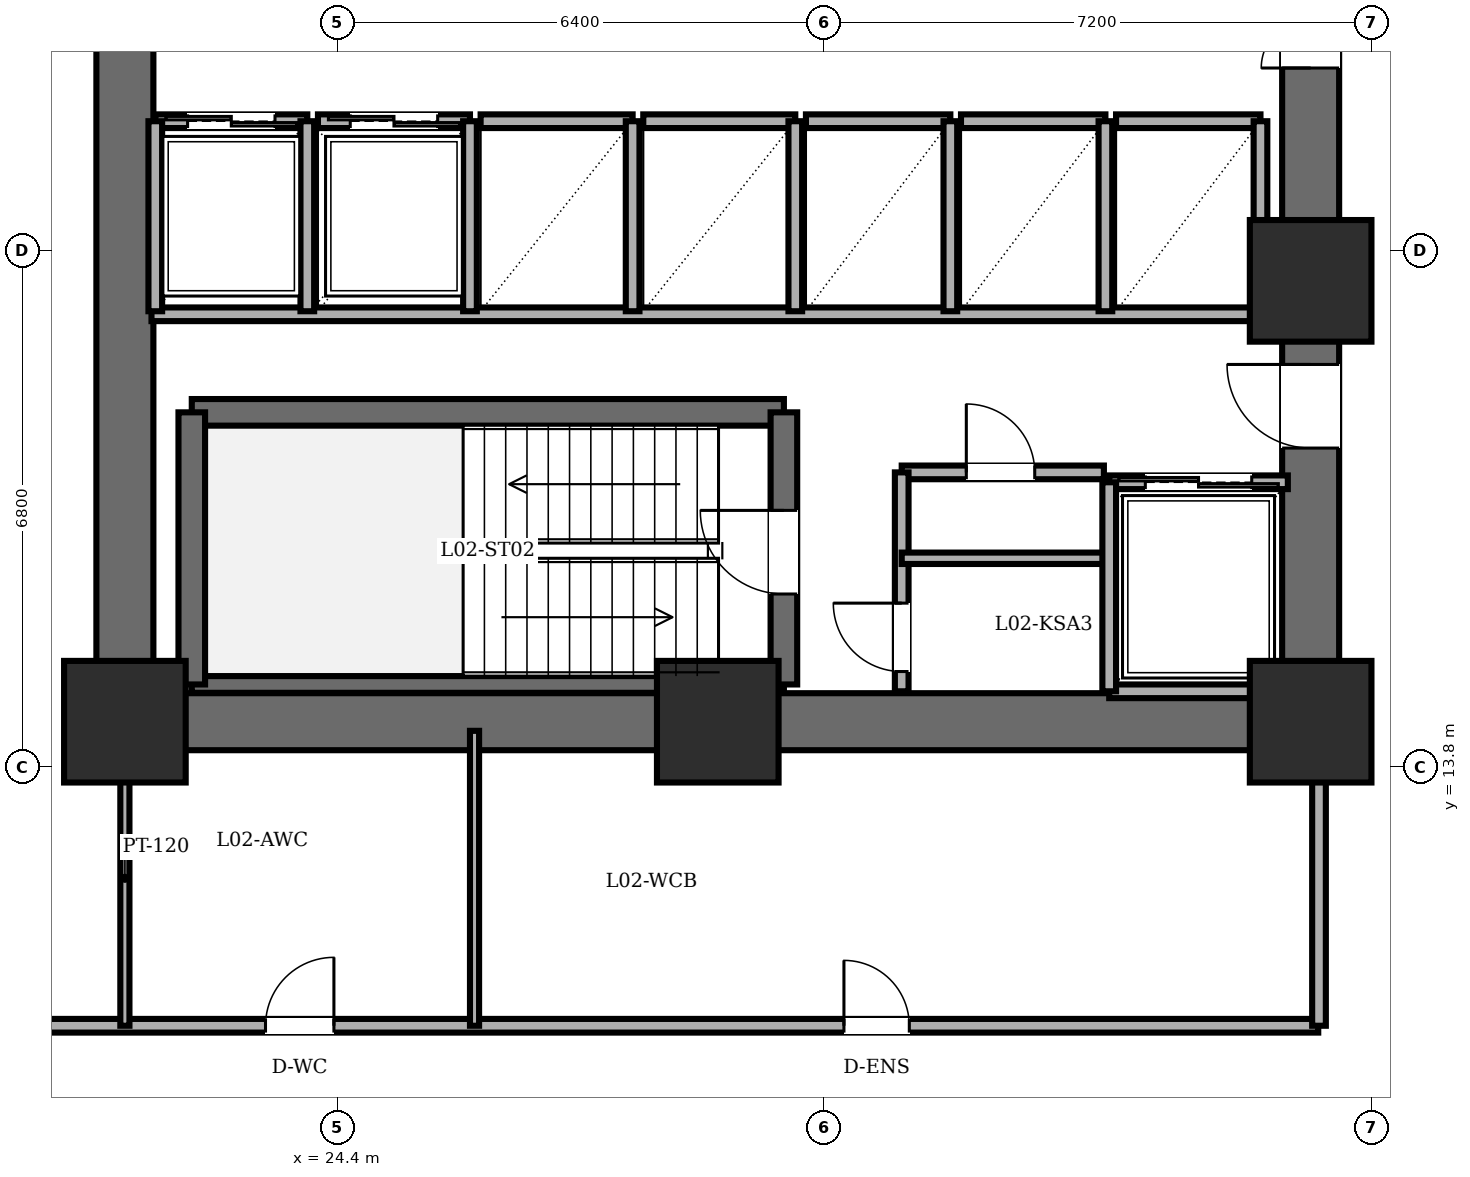
"""IFC4 building model, lengths in metres.
Left out: names, types, materials, properties, quantities, classifications, styles, units other than length and angle.
Written with IfcOpenShell. Run it as: python <this file> out.ifc"""

import sys

from ifc_helpers import new_model, si_unit, direction, frame, frame_2d, origin, origin_2d, place, context, subcontext, project, spatial, rectangle, extrude, element, fill, save


model = new_model("IFC4")
c1 = context("Model", 3, precision=1e-05, world=origin(), true_north=direction((0.0, 1.0)))
c2 = subcontext(c1, "Body", "Model", "MODEL_VIEW")
j1 = project(units=[si_unit("LENGTHUNIT", "METRE"), si_unit("PLANEANGLEUNIT", "RADIAN")], contexts=[c1])
p1 = place(None, origin())
s1 = spatial("IfcSite", under=j1, at=p1, CompositionType="ELEMENT")
p2 = place(p1, origin())
s2 = spatial("IfcBuilding", under=s1, at=p2, CompositionType="ELEMENT")
p3 = place(p2, frame((0.0, 0.0, 5.4)))
s3 = spatial("IfcBuildingStorey", under=s2, at=p3, CompositionType="ELEMENT", Elevation=5.4)
for number, where, z_axis, x_axis in (
    (1, (21.6, 14.4, 0.0), (0.0, 0.0, 1.0), (1.0, 0.0, 0.0)),
    (2, (29.4, 14.4, 0.0), (0.0, 0.0, 1.0), (1.0, 0.0, 0.0)),
    (3, (37.2, 14.4, 0.0), (0.0, 0.0, 1.0), (1.0, 0.0, 0.0)),
    (4, (37.2, 20.2, 0.0), (0.0, 0.0, 1.0), (1.0, 0.0, 0.0)),
):
    element("IfcColumn", number, at=place(p3, frame(where, z_axis=z_axis, x_axis=x_axis)), inside=s3, PredefinedType="COLUMN", context=c2, shape_type="SweptSolid", body=[
        extrude(rectangle(XDim=1.6, YDim=1.6, at=origin_2d()), origin(), (0.0, 0.0, 1.0), 4.65),
    ])
p4 = place(p3, frame((21.6, 14.4, 0.0), z_axis=(0.0, 0.0, 1.0), x_axis=(0.0, 1.0, 0.0)))
e5 = element("IfcWall", 5, at=p4, inside=s3, PredefinedType="SHEAR", context=c2, shape_type="SweptSolid", body=[
    extrude(rectangle(XDim=19.2, YDim=0.75, at=frame_2d((9.6, 0.0))), origin(), (0.0, 0.0, 1.0), 4.43),
])
p5 = place(p3, frame((37.2, 14.4, 0.0), z_axis=(0.0, 0.0, 1.0), x_axis=(-1.0, 0.0, 0.0)))
e6 = element("IfcWall", 6, at=p5, inside=s3, PredefinedType="SHEAR", context=c2, shape_type="SweptSolid", body=[
    extrude(rectangle(XDim=15.6, YDim=0.75, at=frame_2d((7.8, 0.0))), origin(), (0.0, 0.0, 1.0), 4.43),
])
p6 = place(p3, frame((37.2, 14.4, 0.0), z_axis=(0.0, 0.0, 1.0), x_axis=(0.0, 1.0, 0.0)))
e7 = element("IfcWall", 7, at=p6, inside=s3, PredefinedType="SHEAR", context=c2, shape_type="SweptSolid", body=[
    extrude(rectangle(XDim=19.2, YDim=0.75, at=frame_2d((9.6, 0.0))), origin(), (0.0, 0.0, 1.0), 4.43),
])
p7 = place(p6, frame((15.8, 0.0, 0.0)))
e8 = element("IfcOpeningElement", 8, at=p7, cuts=e7, PredefinedType="OPENING", context=c2, shape_type="SweptSolid", body=[
    extrude(rectangle(XDim=1.15, YDim=2.15, at=frame_2d((0.575, 1.075))), frame((0.0, 0.385, 0.0), z_axis=(0.0, -1.0, 0.0), x_axis=(1.0, 0.0, 0.0)), (0.0, 0.0, 1.0), 0.77),
])
p8 = place(p6, frame((3.6, 0.0, 0.0)))
e9 = element("IfcOpeningElement", 9, at=p8, cuts=e7, PredefinedType="OPENING", context=c2, shape_type="SweptSolid", body=[
    extrude(rectangle(XDim=1.1, YDim=2.15, at=frame_2d((0.55, 1.075))), frame((0.0, 0.385, 0.0), z_axis=(0.0, -1.0, 0.0), x_axis=(1.0, 0.0, 0.0)), (0.0, 0.0, 1.0), 0.77),
])
p9 = place(p6, frame((8.6, 0.0, 0.0)))
e10 = element("IfcOpeningElement", 10, at=p9, cuts=e7, PredefinedType="OPENING", context=c2, shape_type="SweptSolid", body=[
    extrude(rectangle(XDim=1.3, YDim=2.2, at=frame_2d((0.65, 1.1))), frame((0.0, 0.385, 0.0), z_axis=(0.0, -1.0, 0.0), x_axis=(1.0, 0.0, 0.0)), (0.0, 0.0, 1.0), 0.77),
])
p10 = place(p3, frame((22.48, 18.47, 0.0), z_axis=(0.0, 0.0, 1.0), x_axis=(1.0, 0.0, 0.0)))
e11 = element("IfcWall", 11, at=p10, inside=s3, PredefinedType="SOLIDWALL", context=c2, shape_type="SweptSolid", body=[
    extrude(rectangle(XDim=7.79, YDim=0.35, at=frame_2d((3.895, 0.0))), origin(), (0.0, 0.0, 1.0), 4.43),
])
p11 = place(p3, frame((22.48, 14.89, 0.0), z_axis=(0.0, 0.0, 1.0), x_axis=(1.0, 0.0, 0.0)))
e12 = element("IfcWall", 12, at=p11, inside=s3, PredefinedType="PARTITIONING", context=c2, shape_type="SweptSolid", body=[
    extrude(rectangle(XDim=7.79, YDim=0.22, at=frame_2d((3.895, 0.0))), origin(), (0.0, 0.0, 1.0), 4.43),
])
p12 = place(p3, frame((22.48, 14.89, 0.0), z_axis=(0.0, 0.0, 1.0), x_axis=(0.0, 1.0, 0.0)))
e13 = element("IfcWall", 13, at=p12, inside=s3, PredefinedType="SOLIDWALL", context=c2, shape_type="SweptSolid", body=[
    extrude(rectangle(XDim=3.58, YDim=0.35, at=frame_2d((1.79, 0.0))), origin(), (0.0, 0.0, 1.0), 4.43),
])
p13 = place(p3, frame((30.27, 14.89, 0.0), z_axis=(0.0, 0.0, 1.0), x_axis=(0.0, 1.0, 0.0)))
e14 = element("IfcWall", 14, at=p13, inside=s3, PredefinedType="SOLIDWALL", context=c2, shape_type="SweptSolid", body=[
    extrude(rectangle(XDim=3.58, YDim=0.35, at=frame_2d((1.79, 0.0))), origin(), (0.0, 0.0, 1.0), 4.43),
])
p14 = place(p13, frame((1.19, 0.0, 0.0)))
e15 = element("IfcOpeningElement", 15, at=p14, cuts=e14, PredefinedType="OPENING", context=c2, shape_type="SweptSolid", body=[
    extrude(rectangle(XDim=1.1, YDim=2.15, at=frame_2d((0.55, 1.075))), frame((0.0, 0.185, 0.0), z_axis=(0.0, -1.0, 0.0), x_axis=(1.0, 0.0, 0.0)), (0.0, 0.0, 1.0), 0.37),
])
p15 = place(p3, frame((21.95, 19.76, 0.0), z_axis=(0.0, 0.0, 1.0), x_axis=(1.0, 0.0, 0.0)))
e16 = element("IfcWall", 16, at=p15, inside=s3, PredefinedType="PARTITIONING", context=c2, shape_type="SweptSolid", body=[
    extrude(rectangle(XDim=14.87, YDim=0.18, at=frame_2d((7.435, 0.0))), origin(), (0.0, 0.0, 1.0), 4.43),
])
p16 = place(p3, frame((31.82, 17.68, 0.0), z_axis=(0.0, 0.0, 1.0), x_axis=(1.0, 0.0, 0.0)))
e17 = element("IfcWall", 17, at=p16, inside=s3, PredefinedType="PARTITIONING", context=c2, shape_type="SweptSolid", body=[
    extrude(rectangle(XDim=2.66, YDim=0.18, at=frame_2d((1.33, 0.0))), origin(), (0.0, 0.0, 1.0), 4.43),
])
p17 = place(p16, frame((0.85, 0.0, 0.0)))
e18 = element("IfcOpeningElement", 18, at=p17, cuts=e17, PredefinedType="OPENING", context=c2, shape_type="SweptSolid", body=[
    extrude(rectangle(XDim=0.9, YDim=2.05, at=frame_2d((0.45, 1.025))), frame((0.0, 0.1, 0.0), z_axis=(0.0, -1.0, 0.0), x_axis=(1.0, 0.0, 0.0)), (0.0, 0.0, 1.0), 0.2),
])
p18 = place(p3, frame((31.82, 14.8, 0.0), z_axis=(0.0, 0.0, 1.0), x_axis=(0.0, 1.0, 0.0)))
e19 = element("IfcWall", 19, at=p18, inside=s3, PredefinedType="PARTITIONING", context=c2, shape_type="SweptSolid", body=[
    extrude(rectangle(XDim=2.88, YDim=0.18, at=frame_2d((1.44, 0.0))), origin(), (0.0, 0.0, 1.0), 4.43),
])
p19 = place(p18, frame((0.26, 0.0, 0.0)))
e20 = element("IfcOpeningElement", 20, at=p19, cuts=e19, PredefinedType="OPENING", context=c2, shape_type="SweptSolid", body=[
    extrude(rectangle(XDim=0.9, YDim=2.05, at=frame_2d((0.45, 1.025))), frame((0.0, 0.1, 0.0), z_axis=(0.0, -1.0, 0.0), x_axis=(1.0, 0.0, 0.0)), (0.0, 0.0, 1.0), 0.2),
])
p20 = place(p3, frame((31.82, 16.55, 0.0), z_axis=(0.0, 0.0, 1.0), x_axis=(1.0, 0.0, 0.0)))
e21 = element("IfcWall", 21, at=p20, inside=s3, PredefinedType="PARTITIONING", context=c2, shape_type="SweptSolid", body=[
    extrude(rectangle(XDim=2.66, YDim=0.15, at=frame_2d((1.33, 0.0))), origin(), (0.0, 0.0, 1.0), 4.43),
])
p21 = place(p3, frame((34.55, 17.55, 0.0), z_axis=(0.0, 0.0, 1.0), x_axis=(1.0, 0.0, 0.0)))
e22 = element("IfcWall", 22, at=p21, inside=s3, PredefinedType="PARTITIONING", context=c2, shape_type="SweptSolid", body=[
    extrude(rectangle(XDim=2.35, YDim=0.18, at=frame_2d((1.175, 0.0))), origin(), (0.0, 0.0, 1.0), 4.43),
])
p22 = place(p21, frame((0.475, 0.0, 0.0)))
e23 = element("IfcOpeningElement", 23, at=p22, cuts=e22, PredefinedType="OPENING", context=c2, shape_type="SweptSolid", body=[
    extrude(rectangle(XDim=1.4, YDim=2.3, at=frame_2d((0.7, 1.15))), frame((0.0, 0.1, 0.0), z_axis=(0.0, -1.0, 0.0), x_axis=(1.0, 0.0, 0.0)), (0.0, 0.0, 1.0), 0.2),
])
p23 = place(p3, frame((36.9, 14.8, 0.0), z_axis=(0.0, 0.0, 1.0), x_axis=(-1.0, 0.0, 0.0)))
e24 = element("IfcWall", 24, at=p23, inside=s3, PredefinedType="PARTITIONING", context=c2, shape_type="SweptSolid", body=[
    extrude(rectangle(XDim=2.35, YDim=0.18, at=frame_2d((1.175, 0.0))), origin(), (0.0, 0.0, 1.0), 4.43),
])
p24 = place(p3, frame((34.55, 17.55, 0.0), z_axis=(0.0, 0.0, 1.0), x_axis=(0.0, -1.0, 0.0)))
e25 = element("IfcWall", 25, at=p24, inside=s3, PredefinedType="PARTITIONING", context=c2, shape_type="SweptSolid", body=[
    extrude(rectangle(XDim=2.75, YDim=0.18, at=frame_2d((1.375, 0.0))), origin(), (0.0, 0.0, 1.0), 4.43),
])
p25 = place(p3, frame((22.0, 22.3, 0.0), z_axis=(0.0, 0.0, 1.0), x_axis=(1.0, 0.0, 0.0)))
e26 = element("IfcWall", 26, at=p25, inside=s3, PredefinedType="PARTITIONING", context=c2, shape_type="SweptSolid", body=[
    extrude(rectangle(XDim=2.0, YDim=0.18, at=frame_2d((1.0, 0.0))), origin(), (0.0, 0.0, 1.0), 4.43),
])
p26 = place(p25, frame((0.425, 0.0, 0.0)))
e27 = element("IfcOpeningElement", 27, at=p26, cuts=e26, PredefinedType="OPENING", context=c2, shape_type="SweptSolid", body=[
    extrude(rectangle(XDim=1.15, YDim=2.2, at=frame_2d((0.575, 1.1))), frame((0.0, 0.1, 0.0), z_axis=(0.0, -1.0, 0.0), x_axis=(1.0, 0.0, 0.0)), (0.0, 0.0, 1.0), 0.2),
])
for number, where, z_axis, x_axis in (
    (28, (24.0, 19.8, 0.0), (0.0, 0.0, 1.0), (0.0, 1.0, 0.0)),
    (29, (22.0, 22.3, 0.0), (0.0, 0.0, 1.0), (0.0, -1.0, 0.0)),
):
    element("IfcWall", number, at=place(p3, frame(where, z_axis=z_axis, x_axis=x_axis)), inside=s3, PredefinedType="PARTITIONING", context=c2, shape_type="SweptSolid", body=[
        extrude(rectangle(XDim=2.5, YDim=0.18, at=frame_2d((1.25, 0.0))), origin(), (0.0, 0.0, 1.0), 4.43),
    ])
p27 = place(p3, frame((24.14, 22.3, 0.0), z_axis=(0.0, 0.0, 1.0), x_axis=(1.0, 0.0, 0.0)))
e30 = element("IfcWall", 30, at=p27, inside=s3, PredefinedType="PARTITIONING", context=c2, shape_type="SweptSolid", body=[
    extrude(rectangle(XDim=2.0, YDim=0.18, at=frame_2d((1.0, 0.0))), origin(), (0.0, 0.0, 1.0), 4.43),
])
p28 = place(p27, frame((0.425, 0.0, 0.0)))
e31 = element("IfcOpeningElement", 31, at=p28, cuts=e30, PredefinedType="OPENING", context=c2, shape_type="SweptSolid", body=[
    extrude(rectangle(XDim=1.15, YDim=2.2, at=frame_2d((0.575, 1.1))), frame((0.0, 0.1, 0.0), z_axis=(0.0, -1.0, 0.0), x_axis=(1.0, 0.0, 0.0)), (0.0, 0.0, 1.0), 0.2),
])
p29 = place(p3, frame((26.14, 19.8, 0.0), z_axis=(0.0, 0.0, 1.0), x_axis=(0.0, 1.0, 0.0)))
e32 = element("IfcWall", 32, at=p29, inside=s3, PredefinedType="PARTITIONING", context=c2, shape_type="SweptSolid", body=[
    extrude(rectangle(XDim=2.5, YDim=0.18, at=frame_2d((1.25, 0.0))), origin(), (0.0, 0.0, 1.0), 4.43),
])
p30 = place(p3, frame((26.28, 22.3, 0.0), z_axis=(0.0, 0.0, 1.0), x_axis=(1.0, 0.0, 0.0)))
e33 = element("IfcWall", 33, at=p30, inside=s3, PredefinedType="PARTITIONING", context=c2, shape_type="SweptSolid", body=[
    extrude(rectangle(XDim=2.0, YDim=0.18, at=frame_2d((1.0, 0.0))), origin(), (0.0, 0.0, 1.0), 4.43),
])
p31 = place(p3, frame((28.28, 19.8, 0.0), z_axis=(0.0, 0.0, 1.0), x_axis=(0.0, 1.0, 0.0)))
e34 = element("IfcWall", 34, at=p31, inside=s3, PredefinedType="PARTITIONING", context=c2, shape_type="SweptSolid", body=[
    extrude(rectangle(XDim=2.5, YDim=0.18, at=frame_2d((1.25, 0.0))), origin(), (0.0, 0.0, 1.0), 4.43),
])
p32 = place(p3, frame((28.42, 22.3, 0.0), z_axis=(0.0, 0.0, 1.0), x_axis=(1.0, 0.0, 0.0)))
e35 = element("IfcWall", 35, at=p32, inside=s3, PredefinedType="PARTITIONING", context=c2, shape_type="SweptSolid", body=[
    extrude(rectangle(XDim=2.0, YDim=0.18, at=frame_2d((1.0, 0.0))), origin(), (0.0, 0.0, 1.0), 4.43),
])
p33 = place(p3, frame((30.42, 19.8, 0.0), z_axis=(0.0, 0.0, 1.0), x_axis=(0.0, 1.0, 0.0)))
e36 = element("IfcWall", 36, at=p33, inside=s3, PredefinedType="PARTITIONING", context=c2, shape_type="SweptSolid", body=[
    extrude(rectangle(XDim=2.5, YDim=0.18, at=frame_2d((1.25, 0.0))), origin(), (0.0, 0.0, 1.0), 4.43),
])
p34 = place(p3, frame((30.56, 22.3, 0.0), z_axis=(0.0, 0.0, 1.0), x_axis=(1.0, 0.0, 0.0)))
e37 = element("IfcWall", 37, at=p34, inside=s3, PredefinedType="PARTITIONING", context=c2, shape_type="SweptSolid", body=[
    extrude(rectangle(XDim=1.9, YDim=0.18, at=frame_2d((0.95, 0.0))), origin(), (0.0, 0.0, 1.0), 4.43),
])
p35 = place(p3, frame((32.46, 19.8, 0.0), z_axis=(0.0, 0.0, 1.0), x_axis=(0.0, 1.0, 0.0)))
e38 = element("IfcWall", 38, at=p35, inside=s3, PredefinedType="PARTITIONING", context=c2, shape_type="SweptSolid", body=[
    extrude(rectangle(XDim=2.5, YDim=0.18, at=frame_2d((1.25, 0.0))), origin(), (0.0, 0.0, 1.0), 4.43),
])
p36 = place(p3, frame((32.6, 22.3, 0.0), z_axis=(0.0, 0.0, 1.0), x_axis=(1.0, 0.0, 0.0)))
e39 = element("IfcWall", 39, at=p36, inside=s3, PredefinedType="PARTITIONING", context=c2, shape_type="SweptSolid", body=[
    extrude(rectangle(XDim=1.9, YDim=0.18, at=frame_2d((0.95, 0.0))), origin(), (0.0, 0.0, 1.0), 4.43),
])
p37 = place(p3, frame((34.5, 19.8, 0.0), z_axis=(0.0, 0.0, 1.0), x_axis=(0.0, 1.0, 0.0)))
e40 = element("IfcWall", 40, at=p37, inside=s3, PredefinedType="PARTITIONING", context=c2, shape_type="SweptSolid", body=[
    extrude(rectangle(XDim=2.5, YDim=0.18, at=frame_2d((1.25, 0.0))), origin(), (0.0, 0.0, 1.0), 4.43),
])
p38 = place(p3, frame((34.64, 22.3, 0.0), z_axis=(0.0, 0.0, 1.0), x_axis=(1.0, 0.0, 0.0)))
e41 = element("IfcWall", 41, at=p38, inside=s3, PredefinedType="PARTITIONING", context=c2, shape_type="SweptSolid", body=[
    extrude(rectangle(XDim=1.9, YDim=0.18, at=frame_2d((0.95, 0.0))), origin(), (0.0, 0.0, 1.0), 4.43),
])
p39 = place(p3, frame((36.54, 19.8, 0.0), z_axis=(0.0, 0.0, 1.0), x_axis=(0.0, 1.0, 0.0)))
e42 = element("IfcWall", 42, at=p39, inside=s3, PredefinedType="PARTITIONING", context=c2, shape_type="SweptSolid", body=[
    extrude(rectangle(XDim=2.5, YDim=0.18, at=frame_2d((1.25, 0.0))), origin(), (0.0, 0.0, 1.0), 4.43),
])
p40 = place(p3, frame((17.85, 10.4, 0.0), z_axis=(0.0, 0.0, 1.0), x_axis=(1.0, 0.0, 0.0)))
e43 = element("IfcWall", 43, at=p40, inside=s3, PredefinedType="PARTITIONING", context=c2, shape_type="SweptSolid", body=[
    extrude(rectangle(XDim=19.45, YDim=0.18, at=frame_2d((9.725, 0.0))), origin(), (0.0, 0.0, 1.0), 4.43),
])
p41 = place(p40, frame((1.575, 0.0, 0.0)))
e44 = element("IfcOpeningElement", 44, at=p41, cuts=e43, PredefinedType="OPENING", context=c2, shape_type="SweptSolid", body=[
    extrude(rectangle(XDim=0.92, YDim=2.1, at=frame_2d((0.46, 1.05))), frame((0.0, 0.1, 0.0), z_axis=(0.0, -1.0, 0.0), x_axis=(1.0, 0.0, 0.0)), (0.0, 0.0, 1.0), 0.2),
])
p42 = place(p40, frame((5.6, 0.0, 0.0)))
e45 = element("IfcOpeningElement", 45, at=p42, cuts=e43, PredefinedType="OPENING", context=c2, shape_type="SweptSolid", body=[
    extrude(rectangle(XDim=0.9, YDim=2.1, at=frame_2d((0.45, 1.05))), frame((0.0, 0.1, 0.0), z_axis=(0.0, -1.0, 0.0), x_axis=(1.0, 0.0, 0.0)), (0.0, 0.0, 1.0), 0.2),
])
p43 = place(p40, frame((13.21, 0.0, 0.0)))
e46 = element("IfcOpeningElement", 46, at=p43, cuts=e43, PredefinedType="OPENING", context=c2, shape_type="SweptSolid", body=[
    extrude(rectangle(XDim=0.86, YDim=2.1, at=frame_2d((0.43, 1.05))), frame((0.0, 0.1, 0.0), z_axis=(0.0, -1.0, 0.0), x_axis=(1.0, 0.0, 0.0)), (0.0, 0.0, 1.0), 0.2),
])
p44 = place(p3, frame((21.6, 10.4, 0.0), z_axis=(0.0, 0.0, 1.0), x_axis=(0.0, 1.0, 0.0)))
e47 = element("IfcWall", 47, at=p44, inside=s3, PredefinedType="PARTITIONING", context=c2, shape_type="SweptSolid", body=[
    extrude(rectangle(XDim=3.88, YDim=0.12, at=frame_2d((1.94, 0.0))), origin(), (0.0, 0.0, 1.0), 3.612),
])
p45 = place(p3, frame((26.2, 10.4, 0.0), z_axis=(0.0, 0.0, 1.0), x_axis=(0.0, 1.0, 0.0)))
e48 = element("IfcWall", 48, at=p45, inside=s3, PredefinedType="PARTITIONING", context=c2, shape_type="SweptSolid", body=[
    extrude(rectangle(XDim=3.88, YDim=0.12, at=frame_2d((1.94, 0.0))), origin(), (0.0, 0.0, 1.0), 4.43),
])
p46 = place(p3, frame((37.31, 10.4, 0.0), z_axis=(0.0, 0.0, 1.0), x_axis=(0.0, 1.0, 0.0)))
e49 = element("IfcWall", 49, at=p46, inside=s3, PredefinedType="PARTITIONING", context=c2, shape_type="SweptSolid", body=[
    extrude(rectangle(XDim=3.88, YDim=0.18, at=frame_2d((1.94, 0.0))), origin(), (0.0, 0.0, 1.0), 3.612),
])
p47 = place(p14, origin())
e50 = element("IfcDoor", 50, at=p47, inside=s3, OperationType="SINGLE_SWING_RIGHT", PredefinedType="DOOR", context=c2, shape_type="SweptSolid", body=[
    extrude(rectangle(XDim=1.1, YDim=2.15, at=frame_2d((0.55, 1.075))), frame((0.0, 0.025, 0.0), z_axis=(0.0, -1.0, 0.0), x_axis=(1.0, 0.0, 0.0)), (0.0, 0.0, 1.0), 0.05),
])
fill(e15, e50)
p48 = place(p8, origin())
e51 = element("IfcDoor", 51, at=p48, inside=s3, OperationType="SINGLE_SWING_RIGHT", PredefinedType="DOOR", context=c2, shape_type="SweptSolid", body=[
    extrude(rectangle(XDim=1.1, YDim=2.15, at=frame_2d((0.55, 1.075))), frame((0.0, 0.025, 0.0), z_axis=(0.0, -1.0, 0.0), x_axis=(1.0, 0.0, 0.0)), (0.0, 0.0, 1.0), 0.05),
])
fill(e9, e51)
p49 = place(p17, origin())
e52 = element("IfcDoor", 52, at=p49, inside=s3, OperationType="SINGLE_SWING_LEFT", PredefinedType="DOOR", context=c2, shape_type="SweptSolid", body=[
    extrude(rectangle(XDim=0.9, YDim=2.05, at=frame_2d((0.45, 1.025))), frame((0.0, 0.025, 0.0), z_axis=(0.0, -1.0, 0.0), x_axis=(1.0, 0.0, 0.0)), (0.0, 0.0, 1.0), 0.05),
])
fill(e18, e52)
p50 = place(p19, origin())
e53 = element("IfcDoor", 53, at=p50, inside=s3, OperationType="SINGLE_SWING_RIGHT", PredefinedType="DOOR", context=c2, shape_type="SweptSolid", body=[
    extrude(rectangle(XDim=0.9, YDim=2.05, at=frame_2d((0.45, 1.025))), frame((0.0, 0.025, 0.0), z_axis=(0.0, -1.0, 0.0), x_axis=(1.0, 0.0, 0.0)), (0.0, 0.0, 1.0), 0.05),
])
fill(e20, e53)
p51 = place(p22, origin())
e54 = element("IfcDoor", 54, at=p51, inside=s3, OperationType="DOUBLE_DOOR_SLIDING", PredefinedType="DOOR", context=c2, shape_type="SweptSolid", body=[
    extrude(rectangle(XDim=1.4, YDim=2.3, at=frame_2d((0.7, 1.15))), frame((0.0, 0.025, 0.0), z_axis=(0.0, -1.0, 0.0), x_axis=(1.0, 0.0, 0.0)), (0.0, 0.0, 1.0), 0.05),
])
fill(e23, e54)
p52 = place(p26, origin())
e55 = element("IfcDoor", 55, at=p52, inside=s3, OperationType="DOUBLE_DOOR_SLIDING", PredefinedType="DOOR", context=c2, shape_type="SweptSolid", body=[
    extrude(rectangle(XDim=1.15, YDim=2.2, at=frame_2d((0.575, 1.1))), frame((0.0, 0.025, 0.0), z_axis=(0.0, -1.0, 0.0), x_axis=(1.0, 0.0, 0.0)), (0.0, 0.0, 1.0), 0.05),
])
fill(e27, e55)
p53 = place(p28, origin())
e56 = element("IfcDoor", 56, at=p53, inside=s3, OperationType="DOUBLE_DOOR_SLIDING", PredefinedType="DOOR", context=c2, shape_type="SweptSolid", body=[
    extrude(rectangle(XDim=1.15, YDim=2.2, at=frame_2d((0.575, 1.1))), frame((0.0, 0.025, 0.0), z_axis=(0.0, -1.0, 0.0), x_axis=(1.0, 0.0, 0.0)), (0.0, 0.0, 1.0), 0.05),
])
fill(e31, e56)
p54 = place(p9, origin())
e57 = element("IfcDoor", 57, at=p54, inside=s3, OperationType="DOUBLE_DOOR_SINGLE_SWING", PredefinedType="DOOR", context=c2, shape_type="SweptSolid", body=[
    extrude(rectangle(XDim=1.3, YDim=2.2, at=frame_2d((0.65, 1.1))), frame((0.0, 0.025, 0.0), z_axis=(0.0, -1.0, 0.0), x_axis=(1.0, 0.0, 0.0)), (0.0, 0.0, 1.0), 0.05),
])
fill(e10, e57)
p55 = place(p42, origin())
e58 = element("IfcDoor", 58, at=p55, inside=s3, OperationType="SINGLE_SWING_RIGHT", PredefinedType="DOOR", context=c2, shape_type="SweptSolid", body=[
    extrude(rectangle(XDim=0.9, YDim=2.1, at=frame_2d((0.45, 1.05))), frame((0.0, 0.025, 0.0), z_axis=(0.0, -1.0, 0.0), x_axis=(1.0, 0.0, 0.0)), (0.0, 0.0, 1.0), 0.05),
])
fill(e45, e58)
p56 = place(p43, origin())
e59 = element("IfcDoor", 59, at=p56, inside=s3, OperationType="SINGLE_SWING_LEFT", PredefinedType="DOOR", context=c2, shape_type="SweptSolid", body=[
    extrude(rectangle(XDim=0.86, YDim=2.1, at=frame_2d((0.43, 1.05))), frame((0.0, 0.025, 0.0), z_axis=(0.0, -1.0, 0.0), x_axis=(1.0, 0.0, 0.0)), (0.0, 0.0, 1.0), 0.05),
])
fill(e46, e59)
save(model, sys.argv[1])
